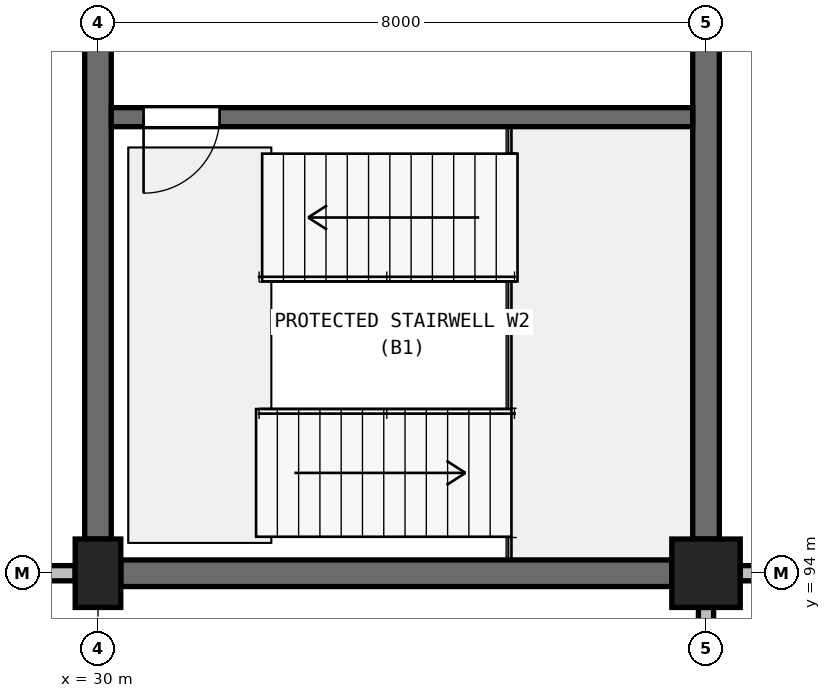
"""IFC4 building model, lengths in metres.
Left out: names, types, materials, properties, quantities, classifications, styles, units other than length and angle.
Written with IfcOpenShell. Run it as: python <this file> out.ifc"""

import sys

from ifc_helpers import new_model, si_unit, direction, frame, frame_2d, origin, origin_2d, place, context, subcontext, project, spatial, rectangle, extrude, element, fill, save


model = new_model("IFC4")
c1 = context("Model", 3, precision=1e-05, world=origin(), true_north=direction((0.0, 1.0)))
c2 = subcontext(c1, "Body", "Model", "MODEL_VIEW")
j1 = project(units=[si_unit("LENGTHUNIT", "METRE"), si_unit("PLANEANGLEUNIT", "RADIAN")], contexts=[c1])
p1 = place(None, origin())
s1 = spatial("IfcSite", under=j1, at=p1, CompositionType="ELEMENT")
p2 = place(p1, origin())
s2 = spatial("IfcBuilding", under=s1, at=p2, CompositionType="ELEMENT")
p3 = place(p2, frame((0.0, 0.0, -4.2)))
s3 = spatial("IfcBuildingStorey", under=s2, at=p3, CompositionType="ELEMENT", Elevation=-4.2)
p4 = place(p3, frame((30.0, 94.0, 0.0), z_axis=(0.0, 0.0, 1.0), x_axis=(1.0, 0.0, 0.0)))
e1 = element("IfcColumn", 1, at=p4, inside=s3, PredefinedType="COLUMN", context=c2, shape_type="SweptSolid", body=[
    extrude(rectangle(XDim=0.6, YDim=0.9, at=origin_2d()), origin(), (0.0, 0.0, 1.0), 4.2),
])
p5 = place(p3, frame((38.0, 94.0, 0.0), z_axis=(0.0, 0.0, 1.0), x_axis=(1.0, 0.0, 0.0)))
e2 = element("IfcColumn", 2, at=p5, inside=s3, PredefinedType="COLUMN", context=c2, shape_type="SweptSolid", body=[
    extrude(rectangle(XDim=0.9, YDim=0.9, at=origin_2d()), origin(), (0.0, 0.0, 1.0), 4.2),
])
p6 = place(p3, frame((30.3, 94.0, 0.0), z_axis=(0.0, 0.0, 1.0), x_axis=(1.0, 0.0, 0.0)))
e3 = element("IfcWall", 3, at=p6, inside=s3, PredefinedType="SHEAR", context=c2, shape_type="SweptSolid", body=[
    extrude(rectangle(XDim=7.25, YDim=0.35, at=frame_2d((3.625, 0.0))), origin(), (0.0, 0.0, 1.0), 3.98),
])
p7 = place(p3, frame((30.0, 94.45, 0.0), z_axis=(0.0, 0.0, 1.0), x_axis=(0.0, 1.0, 0.0)))
e4 = element("IfcWall", 4, at=p7, inside=s3, PredefinedType="SHEAR", context=c2, shape_type="SweptSolid", body=[
    extrude(rectangle(XDim=7.1, YDim=0.35, at=frame_2d((3.55, 0.0))), origin(), (0.0, 0.0, 1.0), 3.98),
])
p8 = place(p3, frame((38.0, 94.45, 0.0), z_axis=(0.0, 0.0, 1.0), x_axis=(0.0, 1.0, 0.0)))
e5 = element("IfcWall", 5, at=p8, inside=s3, PredefinedType="SHEAR", context=c2, shape_type="SweptSolid", body=[
    extrude(rectangle(XDim=7.125, YDim=0.35, at=frame_2d((3.562, 0.0))), origin(), (0.0, 0.0, 1.0), 3.98),
])
p9 = place(p3, frame((30.175, 100.0, 0.0), z_axis=(0.0, 0.0, 1.0), x_axis=(1.0, 0.0, 0.0)))
e6 = element("IfcWall", 6, at=p9, inside=s3, PredefinedType="SOLIDWALL", context=c2, shape_type="SweptSolid", body=[
    extrude(rectangle(XDim=7.65, YDim=0.25, at=frame_2d((3.825, 0.0))), origin(), (0.0, 0.0, 1.0), 3.98),
])
p10 = place(p9, frame((0.425, 0.0, 0.0)))
e7 = element("IfcOpeningElement", 7, at=p10, cuts=e6, PredefinedType="OPENING", context=c2, shape_type="SweptSolid", body=[
    extrude(rectangle(XDim=1.0, YDim=2.2, at=frame_2d((0.5, 1.1))), frame((0.0, 0.135, 0.0), z_axis=(0.0, -1.0, 0.0), x_axis=(1.0, 0.0, 0.0)), (0.0, 0.0, 1.0), 0.27),
])
p11 = place(p3, frame((22.425, 94.0, 0.0), z_axis=(0.0, 0.0, 1.0), x_axis=(1.0, 0.0, 0.0)))
e8 = element("IfcWall", 8, at=p11, inside=s3, PredefinedType="PARTITIONING", context=c2, shape_type="SweptSolid", body=[
    extrude(rectangle(XDim=7.275, YDim=0.2, at=frame_2d((3.637, 0.0))), origin(), (0.0, 0.0, 1.0), 3.02),
])
p12 = place(p11, frame((2.55, 0.0, 0.0)))
e9 = element("IfcOpeningElement", 9, at=p12, cuts=e8, PredefinedType="OPENING", context=c2, shape_type="SweptSolid", body=[
    extrude(rectangle(XDim=1.8, YDim=2.2, at=frame_2d((0.9, 1.1))), frame((0.0, 0.11, 0.0), z_axis=(0.0, -1.0, 0.0), x_axis=(1.0, 0.0, 0.0)), (0.0, 0.0, 1.0), 0.22),
])
p13 = place(p3, frame((38.45, 94.0, 0.0), z_axis=(0.0, 0.0, 1.0), x_axis=(1.0, 0.0, 0.0)))
e10 = element("IfcWall", 10, at=p13, inside=s3, PredefinedType="PARTITIONING", context=c2, shape_type="SweptSolid", body=[
    extrude(rectangle(XDim=7.125, YDim=0.2, at=frame_2d((3.562, 0.0))), origin(), (0.0, 0.0, 1.0), 2.92),
])
p14 = place(p13, frame((2.49, 0.0, 0.0)))
e11 = element("IfcOpeningElement", 11, at=p14, cuts=e10, PredefinedType="OPENING", context=c2, shape_type="SweptSolid", body=[
    extrude(rectangle(XDim=1.8, YDim=2.2, at=frame_2d((0.9, 1.1))), frame((0.0, 0.11, 0.0), z_axis=(0.0, -1.0, 0.0), x_axis=(1.0, 0.0, 0.0)), (0.0, 0.0, 1.0), 0.22),
])
p15 = place(p3, frame((38.0, 86.45, 0.0), z_axis=(0.0, 0.0, 1.0), x_axis=(0.0, 1.0, 0.0)))
e12 = element("IfcWall", 12, at=p15, inside=s3, PredefinedType="PARTITIONING", context=c2, shape_type="SweptSolid", body=[
    extrude(rectangle(XDim=7.1, YDim=0.2, at=frame_2d((3.55, 0.0))), origin(), (0.0, 0.0, 1.0), 3.27),
])
p16 = place(p10, frame((1.0, 0.0, 0.0), z_axis=(0.0, 0.0, 1.0), x_axis=(-1.0, 0.0, 0.0)))
e13 = element("IfcDoor", 13, at=p16, inside=s3, OperationType="SINGLE_SWING_LEFT", PredefinedType="DOOR", context=c2, shape_type="SweptSolid", body=[
    extrude(rectangle(XDim=1.0, YDim=2.2, at=frame_2d((0.5, 1.1))), frame((0.0, 0.025, 0.0), z_axis=(0.0, -1.0, 0.0), x_axis=(1.0, 0.0, 0.0)), (0.0, 0.0, 1.0), 0.05),
])
fill(e7, e13)
save(model, sys.argv[1])
